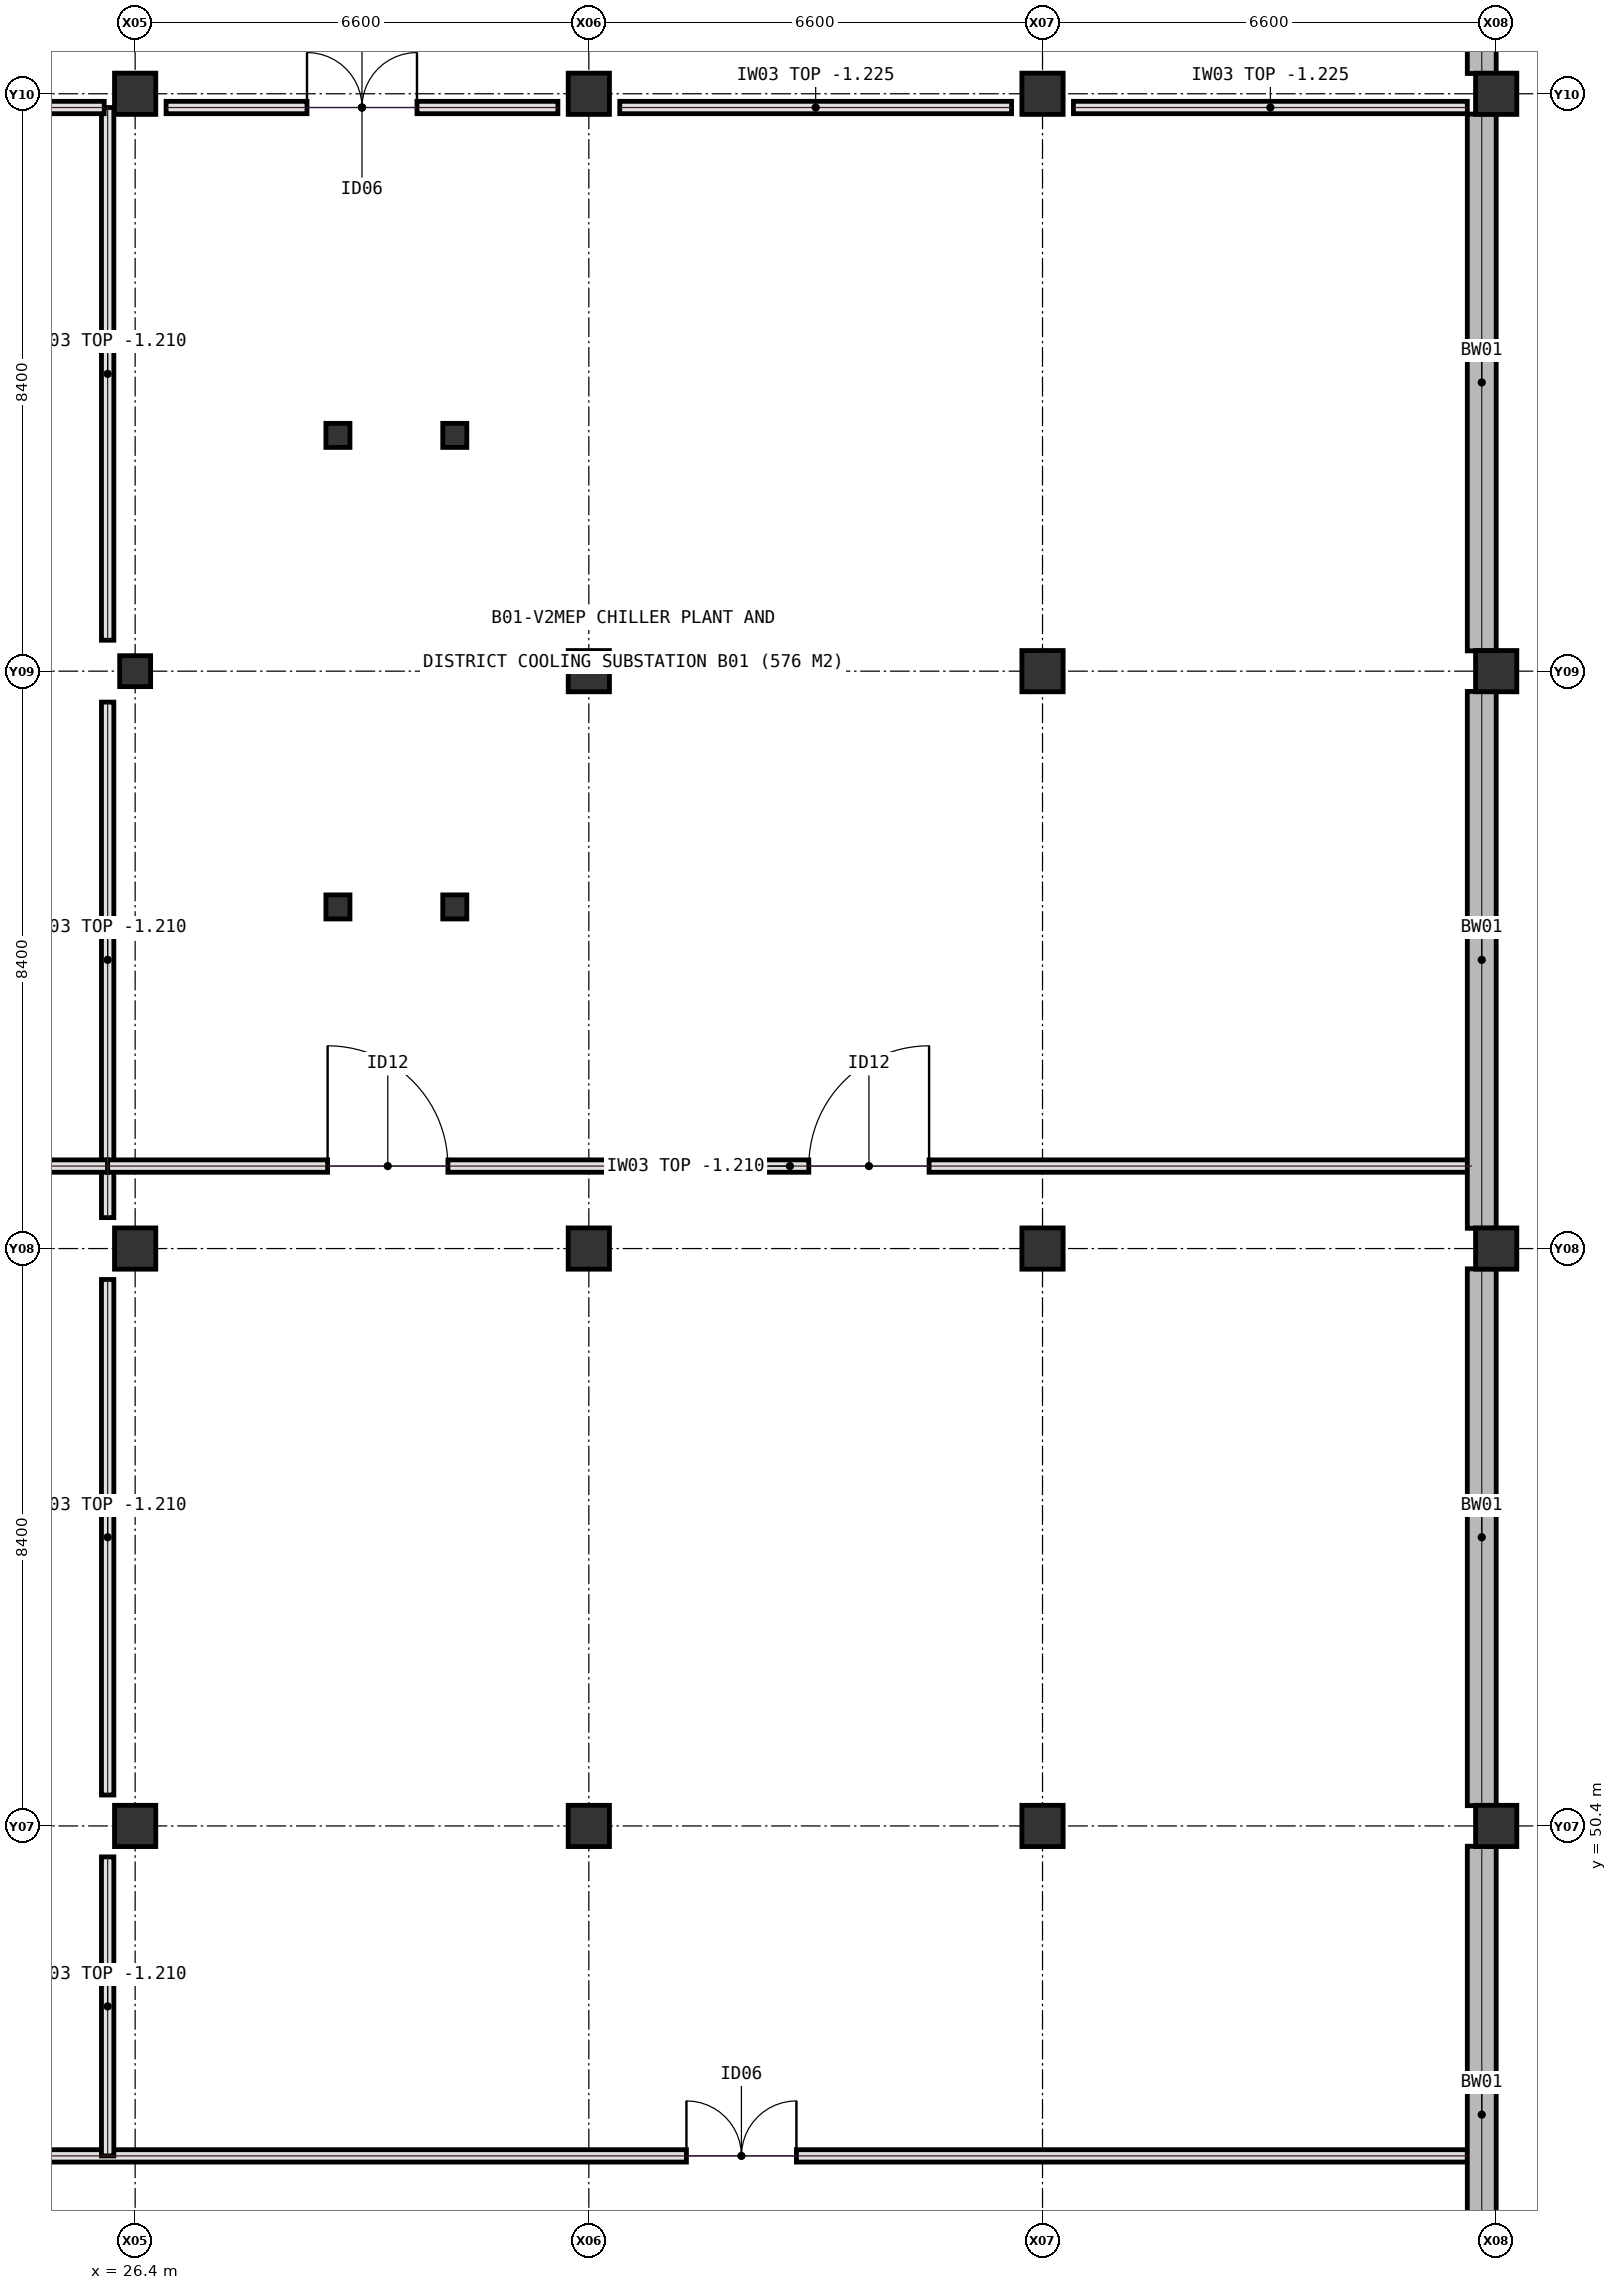
"""IFC4 building model, lengths in metres.
Left out: names, types, materials, properties, quantities, classifications, styles, units other than length and angle.
Written with IfcOpenShell. Run it as: python <this file> out.ifc"""

import sys

from ifc_helpers import new_model, si_unit, direction, frame, frame_2d, origin, origin_2d, place, context, subcontext, project, spatial, rectangle, extrude, element, fill, save


model = new_model("IFC4")
c1 = context("Model", 3, precision=1e-05, world=origin(), true_north=direction((0.0, 1.0)))
c2 = subcontext(c1, "Body", "Model", "MODEL_VIEW")
j1 = project(units=[si_unit("LENGTHUNIT", "METRE"), si_unit("PLANEANGLEUNIT", "RADIAN")], contexts=[c1])
p1 = place(None, origin())
s1 = spatial("IfcSite", under=j1, at=p1, CompositionType="ELEMENT")
p2 = place(p1, origin())
s2 = spatial("IfcBuilding", under=s1, at=p2, CompositionType="ELEMENT")
p3 = place(p2, frame((0.0, 0.0, -4.5)))
s3 = spatial("IfcBuildingStorey", under=s2, at=p3, CompositionType="ELEMENT", Elevation=-4.5)
for number, where, z_axis, x_axis in (
    (1, (26.4, 50.4, 0.0), (0.0, 0.0, 1.0), (1.0, 0.0, 0.0)),
    (2, (26.4, 58.8, 0.0), (0.0, 0.0, 1.0), (1.0, 0.0, 0.0)),
):
    element("IfcColumn", number, at=place(p3, frame(where, z_axis=z_axis, x_axis=x_axis)), inside=s3, PredefinedType="COLUMN", context=c2, shape_type="SweptSolid", body=[
        extrude(rectangle(XDim=0.6, YDim=0.6, at=origin_2d()), origin(), (0.0, 0.0, 1.0), 4.5),
    ])
p4 = place(p3, frame((26.4, 67.2, 0.0), z_axis=(0.0, 0.0, 1.0), x_axis=(1.0, 0.0, 0.0)))
e3 = element("IfcColumn", 3, at=p4, inside=s3, PredefinedType="COLUMN", context=c2, shape_type="SweptSolid", body=[
    extrude(rectangle(XDim=0.45, YDim=0.45, at=origin_2d()), origin(), (0.0, 0.0, 1.0), 4.5),
])
for number, where, z_axis, x_axis in (
    (4, (26.4, 75.6, 0.0), (0.0, 0.0, 1.0), (1.0, 0.0, 0.0)),
    (5, (33.0, 50.4, 0.0), (0.0, 0.0, 1.0), (1.0, 0.0, 0.0)),
    (6, (33.0, 58.8, 0.0), (0.0, 0.0, 1.0), (1.0, 0.0, 0.0)),
    (7, (33.0, 67.2, 0.0), (0.0, 0.0, 1.0), (1.0, 0.0, 0.0)),
    (8, (33.0, 75.6, 0.0), (0.0, 0.0, 1.0), (1.0, 0.0, 0.0)),
    (9, (39.6, 50.4, 0.0), (0.0, 0.0, 1.0), (1.0, 0.0, 0.0)),
    (10, (39.6, 58.8, 0.0), (0.0, 0.0, 1.0), (1.0, 0.0, 0.0)),
    (11, (39.6, 67.2, 0.0), (0.0, 0.0, 1.0), (1.0, 0.0, 0.0)),
    (12, (39.6, 75.6, 0.0), (0.0, 0.0, 1.0), (1.0, 0.0, 0.0)),
    (13, (46.2, 50.4, 0.0), (0.0, 0.0, 1.0), (1.0, 0.0, 0.0)),
    (14, (46.2, 58.8, 0.0), (0.0, 0.0, 1.0), (1.0, 0.0, 0.0)),
    (15, (46.2, 67.2, 0.0), (0.0, 0.0, 1.0), (1.0, 0.0, 0.0)),
    (16, (46.2, 75.6, 0.0), (0.0, 0.0, 1.0), (1.0, 0.0, 0.0)),
):
    element("IfcColumn", number, at=place(p3, frame(where, z_axis=z_axis, x_axis=x_axis)), inside=s3, PredefinedType="COLUMN", context=c2, shape_type="SweptSolid", body=[
        extrude(rectangle(XDim=0.6, YDim=0.6, at=origin_2d()), origin(), (0.0, 0.0, 1.0), 4.5),
    ])
p5 = place(p3, frame((0.42, 45.6, 0.0), z_axis=(0.0, 0.0, 1.0), x_axis=(1.0, 0.0, 0.0)))
e17 = element("IfcWall", 17, at=p5, inside=s3, PredefinedType="SOLIDWALL", context=c2, shape_type="SweptSolid", body=[
    extrude(rectangle(XDim=45.36, YDim=0.18, at=frame_2d((22.68, 0.0))), origin(), (0.0, 0.0, 1.0), 3.29),
])
p6 = place(p5, frame((12.0, 0.0, 0.0)))
e18 = element("IfcOpeningElement", 18, at=p6, cuts=e17, PredefinedType="OPENING", context=c2, shape_type="SweptSolid", body=[
    extrude(rectangle(XDim=1.6, YDim=2.2, at=frame_2d((0.8, 1.1))), frame((0.0, 0.1, 0.0), z_axis=(0.0, -1.0, 0.0), x_axis=(1.0, 0.0, 0.0)), (0.0, 0.0, 1.0), 0.2),
])
p7 = place(p5, frame((34.0, 0.0, 0.0)))
e19 = element("IfcOpeningElement", 19, at=p7, cuts=e17, PredefinedType="OPENING", context=c2, shape_type="SweptSolid", body=[
    extrude(rectangle(XDim=1.6, YDim=2.2, at=frame_2d((0.8, 1.1))), frame((0.0, 0.1, 0.0), z_axis=(0.0, -1.0, 0.0), x_axis=(1.0, 0.0, 0.0)), (0.0, 0.0, 1.0), 0.2),
])
p8 = place(p3, frame((26.0, 45.6, 0.0), z_axis=(0.0, 0.0, 1.0), x_axis=(0.0, 1.0, 0.0)))
e20 = element("IfcWall", 20, at=p8, inside=s3, PredefinedType="SOLIDWALL", context=c2, shape_type="SweptSolid", body=[
    extrude(rectangle(XDim=4.35, YDim=0.18, at=frame_2d((2.175, 0.0))), origin(), (0.0, 0.0, 1.0), 3.29),
])
for number, where, z_axis, x_axis in (
    (21, (26.0, 50.85, 0.0), (0.0, 0.0, 1.0), (0.0, 1.0, 0.0)),
    (22, (26.0, 59.25, 0.0), (0.0, 0.0, 1.0), (0.0, 1.0, 0.0)),
):
    element("IfcWall", number, at=place(p3, frame(where, z_axis=z_axis, x_axis=x_axis)), inside=s3, PredefinedType="SOLIDWALL", context=c2, shape_type="SweptSolid", body=[
        extrude(rectangle(XDim=7.5, YDim=0.18, at=frame_2d((3.75, 0.0))), origin(), (0.0, 0.0, 1.0), 3.29),
    ])
p9 = place(p3, frame((26.0, 67.65, 0.0), z_axis=(0.0, 0.0, 1.0), x_axis=(0.0, 1.0, 0.0)))
e23 = element("IfcWall", 23, at=p9, inside=s3, PredefinedType="SOLIDWALL", context=c2, shape_type="SweptSolid", body=[
    extrude(rectangle(XDim=7.75, YDim=0.18, at=frame_2d((3.875, 0.0))), origin(), (0.0, 0.0, 1.0), 3.29),
])
p10 = place(p3, frame((20.25, 75.4, 0.0), z_axis=(0.0, 0.0, 1.0), x_axis=(1.0, 0.0, 0.0)))
e24 = element("IfcWall", 24, at=p10, inside=s3, PredefinedType="SOLIDWALL", context=c2, shape_type="SweptSolid", body=[
    extrude(rectangle(XDim=5.7, YDim=0.18, at=frame_2d((2.85, 0.0))), origin(), (0.0, 0.0, 1.0), 3.275),
])
p11 = place(p3, frame((26.85, 75.4, 0.0), z_axis=(0.0, 0.0, 1.0), x_axis=(1.0, 0.0, 0.0)))
e25 = element("IfcWall", 25, at=p11, inside=s3, PredefinedType="SOLIDWALL", context=c2, shape_type="SweptSolid", body=[
    extrude(rectangle(XDim=5.7, YDim=0.18, at=frame_2d((2.85, 0.0))), origin(), (0.0, 0.0, 1.0), 3.275),
])
p12 = place(p11, frame((2.05, 0.0, 0.0)))
e26 = element("IfcOpeningElement", 26, at=p12, cuts=e25, PredefinedType="OPENING", context=c2, shape_type="SweptSolid", body=[
    extrude(rectangle(XDim=1.6, YDim=2.2, at=frame_2d((0.8, 1.1))), frame((0.0, 0.1, 0.0), z_axis=(0.0, -1.0, 0.0), x_axis=(1.0, 0.0, 0.0)), (0.0, 0.0, 1.0), 0.2),
])
p13 = place(p3, frame((33.45, 75.4, 0.0), z_axis=(0.0, 0.0, 1.0), x_axis=(1.0, 0.0, 0.0)))
e27 = element("IfcWall", 27, at=p13, inside=s3, PredefinedType="SOLIDWALL", context=c2, shape_type="SweptSolid", body=[
    extrude(rectangle(XDim=5.7, YDim=0.18, at=frame_2d((2.85, 0.0))), origin(), (0.0, 0.0, 1.0), 3.275),
])
p14 = place(p3, frame((40.05, 75.4, 0.0), z_axis=(0.0, 0.0, 1.0), x_axis=(1.0, 0.0, 0.0)))
e28 = element("IfcWall", 28, at=p14, inside=s3, PredefinedType="SOLIDWALL", context=c2, shape_type="SweptSolid", body=[
    extrude(rectangle(XDim=5.73, YDim=0.18, at=frame_2d((2.865, 0.0))), origin(), (0.0, 0.0, 1.0), 3.275),
])
p15 = place(p3, frame((0.42, 60.0, 0.0), z_axis=(0.0, 0.0, 1.0), x_axis=(1.0, 0.0, 0.0)))
e29 = element("IfcWall", 29, at=p15, inside=s3, PredefinedType="SOLIDWALL", context=c2, shape_type="SweptSolid", body=[
    extrude(rectangle(XDim=25.58, YDim=0.18, at=frame_2d((12.79, 0.0))), origin(), (0.0, 0.0, 1.0), 3.29),
])
p16 = place(p15, frame((3.2, 0.0, 0.0)))
e30 = element("IfcOpeningElement", 30, at=p16, cuts=e29, PredefinedType="OPENING", context=c2, shape_type="SweptSolid", body=[
    extrude(rectangle(XDim=1.35, YDim=2.2, at=frame_2d((0.675, 1.1))), frame((0.0, 0.1, 0.0), z_axis=(0.0, -1.0, 0.0), x_axis=(1.0, 0.0, 0.0)), (0.0, 0.0, 1.0), 0.2),
])
p17 = place(p15, frame((15.8, 0.0, 0.0)))
e31 = element("IfcOpeningElement", 31, at=p17, cuts=e29, PredefinedType="OPENING", context=c2, shape_type="SweptSolid", body=[
    extrude(rectangle(XDim=1.35, YDim=2.2, at=frame_2d((0.675, 1.1))), frame((0.0, 0.1, 0.0), z_axis=(0.0, -1.0, 0.0), x_axis=(1.0, 0.0, 0.0)), (0.0, 0.0, 1.0), 0.2),
])
p18 = place(p3, frame((26.0, 60.0, 0.0), z_axis=(0.0, 0.0, 1.0), x_axis=(1.0, 0.0, 0.0)))
e32 = element("IfcWall", 32, at=p18, inside=s3, PredefinedType="SOLIDWALL", context=c2, shape_type="SweptSolid", body=[
    extrude(rectangle(XDim=19.85, YDim=0.18, at=frame_2d((9.925, 0.0))), origin(), (0.0, 0.0, 1.0), 3.29),
])
p19 = place(p18, frame((3.2, 0.0, 0.0)))
e33 = element("IfcOpeningElement", 33, at=p19, cuts=e32, PredefinedType="OPENING", context=c2, shape_type="SweptSolid", body=[
    extrude(rectangle(XDim=1.75, YDim=2.3, at=frame_2d((0.875, 1.15))), frame((0.0, 0.1, 0.0), z_axis=(0.0, -1.0, 0.0), x_axis=(1.0, 0.0, 0.0)), (0.0, 0.0, 1.0), 0.2),
])
p20 = place(p18, frame((10.2, 0.0, 0.0)))
e34 = element("IfcOpeningElement", 34, at=p20, cuts=e32, PredefinedType="OPENING", context=c2, shape_type="SweptSolid", body=[
    extrude(rectangle(XDim=1.75, YDim=2.3, at=frame_2d((0.875, 1.15))), frame((0.0, 0.1, 0.0), z_axis=(0.0, -1.0, 0.0), x_axis=(1.0, 0.0, 0.0)), (0.0, 0.0, 1.0), 0.2),
])
p21 = place(p3, frame((45.99, 42.295, 0.0), z_axis=(0.0, 0.0, 1.0), x_axis=(0.0, 1.0, 0.0)))
e35 = element("IfcWall", 35, at=p21, inside=s3, PredefinedType="SOLIDWALL", context=c2, shape_type="SweptSolid", body=[
    extrude(rectangle(XDim=7.81, YDim=0.42, at=frame_2d((3.905, 0.0))), origin(), (0.0, 0.0, 1.0), 4.14),
])
p22 = place(p3, frame((45.99, 50.695, 0.0), z_axis=(0.0, 0.0, 1.0), x_axis=(0.0, 1.0, 0.0)))
e36 = element("IfcWall", 36, at=p22, inside=s3, PredefinedType="SOLIDWALL", context=c2, shape_type="SweptSolid", body=[
    extrude(rectangle(XDim=7.81, YDim=0.42, at=frame_2d((3.905, 0.0))), origin(), (0.0, 0.0, 1.0), 4.14),
])
p23 = place(p3, frame((45.99, 59.095, 0.0), z_axis=(0.0, 0.0, 1.0), x_axis=(0.0, 1.0, 0.0)))
e37 = element("IfcWall", 37, at=p23, inside=s3, PredefinedType="SOLIDWALL", context=c2, shape_type="SweptSolid", body=[
    extrude(rectangle(XDim=7.81, YDim=0.42, at=frame_2d((3.905, 0.0))), origin(), (0.0, 0.0, 1.0), 4.14),
])
p24 = place(p3, frame((45.99, 67.495, 0.0), z_axis=(0.0, 0.0, 1.0), x_axis=(0.0, 1.0, 0.0)))
e38 = element("IfcWall", 38, at=p24, inside=s3, PredefinedType="SOLIDWALL", context=c2, shape_type="SweptSolid", body=[
    extrude(rectangle(XDim=7.81, YDim=0.42, at=frame_2d((3.905, 0.0))), origin(), (0.0, 0.0, 1.0), 4.14),
])
p25 = place(p3, frame((45.99, 75.895, 0.0), z_axis=(0.0, 0.0, 1.0), x_axis=(0.0, 1.0, 0.0)))
e39 = element("IfcWall", 39, at=p25, inside=s3, PredefinedType="SOLIDWALL", context=c2, shape_type="SweptSolid", body=[
    extrude(rectangle(XDim=7.81, YDim=0.42, at=frame_2d((3.905, 0.0))), origin(), (0.0, 0.0, 1.0), 4.14),
])
for number, where, z_axis, x_axis in (
    (40, (29.35, 63.77, 0.0), (0.0, 0.0, 1.0), (1.0, 0.0, 0.0)),
    (41, (31.05, 63.77, 0.0), (0.0, 0.0, 1.0), (1.0, 0.0, 0.0)),
    (42, (31.05, 70.63, 0.0), (0.0, 0.0, 1.0), (1.0, 0.0, 0.0)),
    (43, (29.35, 70.63, 0.0), (0.0, 0.0, 1.0), (1.0, 0.0, 0.0)),
):
    element("IfcColumn", number, at=place(p3, frame(where, z_axis=z_axis, x_axis=x_axis)), inside=s3, PredefinedType="COLUMN", context=c2, shape_type="SweptSolid", body=[
        extrude(rectangle(XDim=0.35, YDim=0.35, at=origin_2d()), origin(), (0.0, 0.0, 1.0), 4.5),
    ])
p26 = place(p7, origin())
e44 = element("IfcDoor", 44, at=p26, inside=s3, OperationType="DOUBLE_DOOR_SINGLE_SWING", PredefinedType="DOOR", context=c2, shape_type="SweptSolid", body=[
    extrude(rectangle(XDim=1.6, YDim=2.2, at=frame_2d((0.8, 1.1))), frame((0.0, 0.025, 0.0), z_axis=(0.0, -1.0, 0.0), x_axis=(1.0, 0.0, 0.0)), (0.0, 0.0, 1.0), 0.05),
])
fill(e19, e44)
p27 = place(p12, origin())
e45 = element("IfcDoor", 45, at=p27, inside=s3, OperationType="DOUBLE_DOOR_SINGLE_SWING", PredefinedType="DOOR", context=c2, shape_type="SweptSolid", body=[
    extrude(rectangle(XDim=1.6, YDim=2.2, at=frame_2d((0.8, 1.1))), frame((0.0, 0.025, 0.0), z_axis=(0.0, -1.0, 0.0), x_axis=(1.0, 0.0, 0.0)), (0.0, 0.0, 1.0), 0.05),
])
fill(e26, e45)
p28 = place(p19, origin())
e46 = element("IfcDoor", 46, at=p28, inside=s3, OperationType="SINGLE_SWING_LEFT", PredefinedType="DOOR", context=c2, shape_type="SweptSolid", body=[
    extrude(rectangle(XDim=1.75, YDim=2.3, at=frame_2d((0.875, 1.15))), frame((0.0, 0.025, 0.0), z_axis=(0.0, -1.0, 0.0), x_axis=(1.0, 0.0, 0.0)), (0.0, 0.0, 1.0), 0.05),
])
fill(e33, e46)
p29 = place(p20, origin())
e47 = element("IfcDoor", 47, at=p29, inside=s3, OperationType="SINGLE_SWING_RIGHT", PredefinedType="DOOR", context=c2, shape_type="SweptSolid", body=[
    extrude(rectangle(XDim=1.75, YDim=2.3, at=frame_2d((0.875, 1.15))), frame((0.0, 0.025, 0.0), z_axis=(0.0, -1.0, 0.0), x_axis=(1.0, 0.0, 0.0)), (0.0, 0.0, 1.0), 0.05),
])
fill(e34, e47)
save(model, sys.argv[1])
